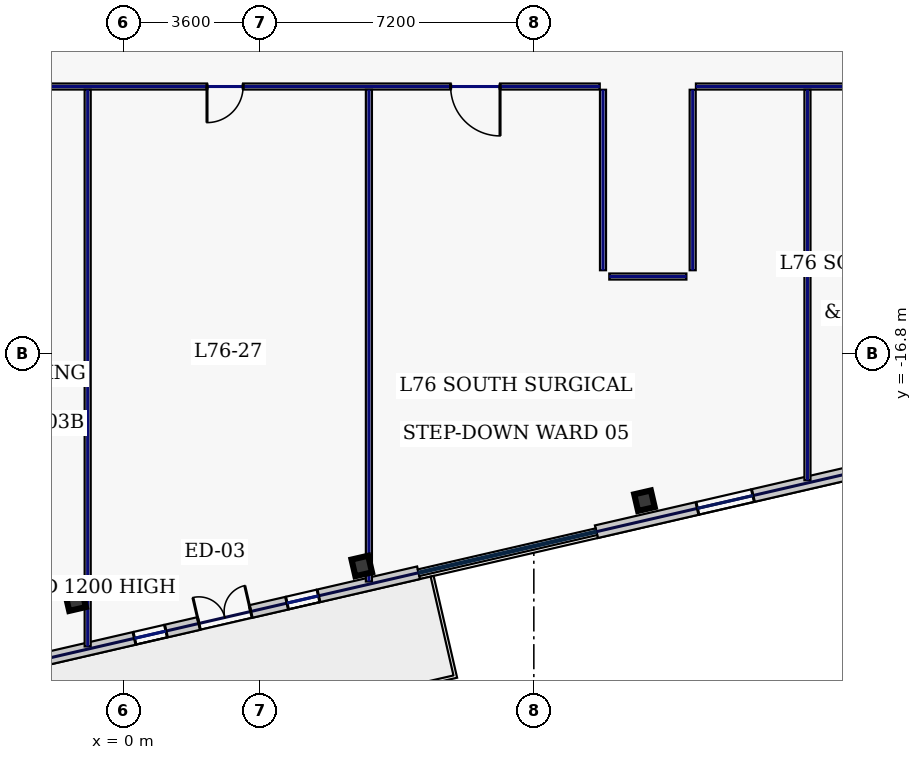
"""IFC4 building model, lengths in metres.
Left out: names, types, materials, properties, quantities, classifications, styles, units other than length and angle.
Written with IfcOpenShell. Run it as: python <this file> out.ifc"""

import sys

from ifc_helpers import new_model, si_unit, direction, frame, frame_2d, origin, origin_2d, place, context, subcontext, project, spatial, rectangle, hollow_rectangle, extrude, element, fill, save


model = new_model("IFC4")
c1 = context("Model", 3, precision=1e-05, world=origin(), true_north=direction((0.0, 1.0)))
c2 = subcontext(c1, "Body", "Model", "MODEL_VIEW")
j1 = project(units=[si_unit("LENGTHUNIT", "METRE"), si_unit("PLANEANGLEUNIT", "RADIAN")], contexts=[c1])
p1 = place(None, origin())
s1 = spatial("IfcSite", under=j1, at=p1, CompositionType="ELEMENT")
p2 = place(p1, origin())
s2 = spatial("IfcBuilding", under=s1, at=p2, CompositionType="ELEMENT")
p3 = place(p2, frame((0.0, 0.0, 325.0)))
s3 = spatial("IfcBuildingStorey", under=s2, at=p3, CompositionType="ELEMENT", Elevation=325.0)
for number, where, z_axis, x_axis in (
    (1, (-1.258, -23.31, 0.0), (0.0, 0.0, 1.0), (0.974, 0.225, 0.0)),
    (2, (6.273, -22.397, 0.0), (0.0, 0.0, 1.0), (0.974, 0.225, 0.0)),
    (3, (13.711, -20.68, 0.0), (0.0, 0.0, 1.0), (0.974, 0.225, 0.0)),
):
    element("IfcColumn", number, at=place(p3, frame(where, z_axis=z_axis, x_axis=x_axis)), inside=s3, PredefinedType="COLUMN", context=c2, shape_type="SweptSolid", body=[
        extrude(hollow_rectangle(XDim=0.45, YDim=0.45, WallThickness=0.022, at=origin_2d()), origin(), (0.0, 0.0, 1.0), 3.74),
    ])
p4 = place(p3, frame((-2.295, -24.898, 0.0), z_axis=(0.0, 0.0, 1.0), x_axis=(0.974370872906, 0.224947553958, 0.0)))
e4 = element("IfcWall", 4, at=p4, inside=s3, PredefinedType="STANDARD", context=c2, shape_type="SweptSolid", body=[
    extrude(rectangle(XDim=10.328, YDim=0.34, at=frame_2d((5.164, 0.0))), origin(), (0.0, 0.0, 1.0), 3.74),
])
p5 = place(p4, frame((4.394, 0.0, 0.0)))
e5 = element("IfcOpeningElement", 5, at=p5, cuts=e4, PredefinedType="OPENING", context=c2, shape_type="SweptSolid", body=[
    extrude(rectangle(XDim=1.4, YDim=2.2, at=frame_2d((0.7, 1.1))), frame((0.0, 0.18, 0.0), z_axis=(0.0, -1.0, 0.0), x_axis=(1.0, 0.0, 0.0)), (0.0, 0.0, 1.0), 0.36),
])
p6 = place(p4, frame((2.655, 0.0, 0.9)))
e6 = element("IfcOpeningElement", 6, at=p6, cuts=e4, PredefinedType="OPENING", context=c2, shape_type="SweptSolid", body=[
    extrude(rectangle(XDim=0.85, YDim=1.85, at=frame_2d((0.425, 0.925))), frame((0.0, 0.18, 0.0), z_axis=(0.0, -1.0, 0.0), x_axis=(1.0, 0.0, 0.0)), (0.0, 0.0, 1.0), 0.36),
])
p7 = place(p4, frame((6.774, 0.0, 0.9)))
e7 = element("IfcOpeningElement", 7, at=p7, cuts=e4, PredefinedType="OPENING", context=c2, shape_type="SweptSolid", body=[
    extrude(rectangle(XDim=0.85, YDim=1.85, at=frame_2d((0.425, 0.925))), frame((0.0, 0.18, 0.0), z_axis=(0.0, -1.0, 0.0), x_axis=(1.0, 0.0, 0.0)), (0.0, 0.0, 1.0), 0.36),
])
p8 = place(p3, frame((12.445, -21.495, 0.0), z_axis=(0.0, 0.0, 1.0), x_axis=(0.974369392164, 0.224953967767, 0.0)))
e8 = element("IfcWall", 8, at=p8, inside=s3, PredefinedType="STANDARD", context=c2, shape_type="SweptSolid", body=[
    extrude(rectangle(XDim=17.366, YDim=0.34, at=frame_2d((8.683, 0.0))), origin(), (0.0, 0.0, 1.0), 3.74),
])
p9 = place(p8, frame((2.729, 0.0, 0.9)))
e9 = element("IfcOpeningElement", 9, at=p9, cuts=e8, PredefinedType="OPENING", context=c2, shape_type="SweptSolid", body=[
    extrude(rectangle(XDim=1.5, YDim=2.0, at=frame_2d((0.75, 1.0))), frame((0.0, 0.18, 0.0), z_axis=(0.0, -1.0, 0.0), x_axis=(1.0, 0.0, 0.0)), (0.0, 0.0, 1.0), 0.36),
])
p10 = place(p8, frame((6.89, 0.0, 0.9)))
e10 = element("IfcOpeningElement", 10, at=p10, cuts=e8, PredefinedType="OPENING", context=c2, shape_type="SweptSolid", body=[
    extrude(rectangle(XDim=0.85, YDim=1.85, at=frame_2d((0.425, 0.925))), frame((0.0, 0.18, 0.0), z_axis=(0.0, -1.0, 0.0), x_axis=(1.0, 0.0, 0.0)), (0.0, 0.0, 1.0), 0.36),
])
p11 = place(p8, frame((10.363, 0.0, 0.9)))
e11 = element("IfcOpeningElement", 11, at=p11, cuts=e8, PredefinedType="OPENING", context=c2, shape_type="SweptSolid", body=[
    extrude(rectangle(XDim=0.85, YDim=1.85, at=frame_2d((0.425, 0.925))), frame((0.0, 0.18, 0.0), z_axis=(0.0, -1.0, 0.0), x_axis=(1.0, 0.0, 0.0)), (0.0, 0.0, 1.0), 0.36),
])
p12 = place(p8, frame((13.875, 0.0, 0.9)))
e12 = element("IfcOpeningElement", 12, at=p12, cuts=e8, PredefinedType="OPENING", context=c2, shape_type="SweptSolid", body=[
    extrude(rectangle(XDim=1.5, YDim=2.0, at=frame_2d((0.75, 1.0))), frame((0.0, 0.18, 0.0), z_axis=(0.0, -1.0, 0.0), x_axis=(1.0, 0.0, 0.0)), (0.0, 0.0, 1.0), 0.36),
])
p13 = place(p3, frame((24.145, -9.78, 0.0), z_axis=(0.0, 0.0, 1.0), x_axis=(-1.0, 0.0, 0.0)))
e13 = element("IfcWall", 13, at=p13, inside=s3, PredefinedType="PARTITIONING", context=c2, shape_type="SweptSolid", body=[
    extrude(rectangle(XDim=9.08, YDim=0.16, at=frame_2d((4.54, 0.0))), origin(), (0.0, 0.0, 1.0), 3.74),
])
p14 = place(p13, frame((2.834, 0.0, 0.0)))
e14 = element("IfcOpeningElement", 14, at=p14, cuts=e13, PredefinedType="OPENING", context=c2, shape_type="SweptSolid", body=[
    extrude(rectangle(XDim=0.95, YDim=2.2, at=frame_2d((0.475, 1.1))), frame((0.0, 0.09, 0.0), z_axis=(0.0, -1.0, 0.0), x_axis=(1.0, 0.0, 0.0)), (0.0, 0.0, 1.0), 0.18),
])
p15 = place(p3, frame((14.98, -9.865, 0.0), z_axis=(0.0, 0.0, 1.0), x_axis=(0.0, -1.0, 0.0)))
e15 = element("IfcWall", 15, at=p15, inside=s3, PredefinedType="PARTITIONING", context=c2, shape_type="SweptSolid", body=[
    extrude(rectangle(XDim=4.75, YDim=0.16, at=frame_2d((2.375, 0.0))), origin(), (0.0, 0.0, 1.0), 3.74),
])
p16 = place(p3, frame((14.815, -14.78, 0.0), z_axis=(0.0, 0.0, 1.0), x_axis=(-1.0, 0.0, 0.0)))
e16 = element("IfcWall", 16, at=p16, inside=s3, PredefinedType="PARTITIONING", context=c2, shape_type="SweptSolid", body=[
    extrude(rectangle(XDim=2.03, YDim=0.16, at=frame_2d((1.015, 0.0))), origin(), (0.0, 0.0, 1.0), 3.74),
])
p17 = place(p3, frame((12.62, -14.615, 0.0), z_axis=(0.0, 0.0, 1.0), x_axis=(0.0, 1.0, 0.0)))
e17 = element("IfcWall", 17, at=p17, inside=s3, PredefinedType="PARTITIONING", context=c2, shape_type="SweptSolid", body=[
    extrude(rectangle(XDim=4.75, YDim=0.16, at=frame_2d((2.375, 0.0))), origin(), (0.0, 0.0, 1.0), 3.74),
])
p18 = place(p3, frame((12.535, -9.78, 0.0), z_axis=(0.0, 0.0, 1.0), x_axis=(-1.0, 0.0, 0.0)))
e18 = element("IfcWall", 18, at=p18, inside=s3, PredefinedType="PARTITIONING", context=c2, shape_type="SweptSolid", body=[
    extrude(rectangle(XDim=36.68, YDim=0.16, at=frame_2d((18.34, 0.0))), origin(), (0.0, 0.0, 1.0), 3.74),
])
p19 = place(p18, frame((33.856, 0.0, 0.0)))
e19 = element("IfcOpeningElement", 19, at=p19, cuts=e18, PredefinedType="OPENING", context=c2, shape_type="SweptSolid", body=[
    extrude(rectangle(XDim=1.15, YDim=2.2, at=frame_2d((0.575, 1.1))), frame((0.0, 0.09, 0.0), z_axis=(0.0, -1.0, 0.0), x_axis=(1.0, 0.0, 0.0)), (0.0, 0.0, 1.0), 0.18),
])
p20 = place(p18, frame((29.535, 0.0, 0.0)))
e20 = element("IfcOpeningElement", 20, at=p20, cuts=e18, PredefinedType="OPENING", context=c2, shape_type="SweptSolid", body=[
    extrude(rectangle(XDim=0.95, YDim=2.2, at=frame_2d((0.475, 1.1))), frame((0.0, 0.09, 0.0), z_axis=(0.0, -1.0, 0.0), x_axis=(1.0, 0.0, 0.0)), (0.0, 0.0, 1.0), 0.18),
])
p21 = place(p18, frame((23.555, 0.0, 0.0)))
e21 = element("IfcOpeningElement", 21, at=p21, cuts=e18, PredefinedType="OPENING", context=c2, shape_type="SweptSolid", body=[
    extrude(rectangle(XDim=1.05, YDim=2.2, at=frame_2d((0.525, 1.1))), frame((0.0, 0.09, 0.0), z_axis=(0.0, -1.0, 0.0), x_axis=(1.0, 0.0, 0.0)), (0.0, 0.0, 1.0), 0.18),
])
p22 = place(p18, frame((16.425, 0.0, 0.0)))
e22 = element("IfcOpeningElement", 22, at=p22, cuts=e18, PredefinedType="OPENING", context=c2, shape_type="SweptSolid", body=[
    extrude(rectangle(XDim=0.95, YDim=2.2, at=frame_2d((0.475, 1.1))), frame((0.0, 0.09, 0.0), z_axis=(0.0, -1.0, 0.0), x_axis=(1.0, 0.0, 0.0)), (0.0, 0.0, 1.0), 0.18),
])
p23 = place(p18, frame((9.385, 0.0, 0.0)))
e23 = element("IfcOpeningElement", 23, at=p23, cuts=e18, PredefinedType="OPENING", context=c2, shape_type="SweptSolid", body=[
    extrude(rectangle(XDim=0.95, YDim=2.2, at=frame_2d((0.475, 1.1))), frame((0.0, 0.09, 0.0), z_axis=(0.0, -1.0, 0.0), x_axis=(1.0, 0.0, 0.0)), (0.0, 0.0, 1.0), 0.18),
])
p24 = place(p18, frame((2.624, 0.0, 0.0)))
e24 = element("IfcOpeningElement", 24, at=p24, cuts=e18, PredefinedType="OPENING", context=c2, shape_type="SweptSolid", body=[
    extrude(rectangle(XDim=1.3, YDim=2.2, at=frame_2d((0.65, 1.1))), frame((0.0, 0.09, 0.0), z_axis=(0.0, -1.0, 0.0), x_axis=(1.0, 0.0, 0.0)), (0.0, 0.0, 1.0), 0.18),
])
p25 = place(p3, frame((-0.94, -24.514, 0.0), z_axis=(0.0, 0.0, 1.0), x_axis=(0.0, 1.0, 0.0)))
e25 = element("IfcWall", 25, at=p25, inside=s3, PredefinedType="PARTITIONING", context=c2, shape_type="SweptSolid", body=[
    extrude(rectangle(XDim=14.649, YDim=0.16, at=frame_2d((7.324, 0.0))), origin(), (0.0, 0.0, 1.0), 3.74),
])
p26 = place(p3, frame((6.46, -22.805, 0.0), z_axis=(0.0, 0.0, 1.0), x_axis=(0.0, 1.0, 0.0)))
e26 = element("IfcWall", 26, at=p26, inside=s3, PredefinedType="PARTITIONING", context=c2, shape_type="SweptSolid", body=[
    extrude(rectangle(XDim=12.94, YDim=0.16, at=frame_2d((6.47, 0.0))), origin(), (0.0, 0.0, 1.0), 3.74),
])
p27 = place(p3, frame((18.0, -20.141, 0.0), z_axis=(0.0, 0.0, 1.0), x_axis=(0.0, 1.0, 0.0)))
e27 = element("IfcWall", 27, at=p27, inside=s3, PredefinedType="PARTITIONING", context=c2, shape_type="SweptSolid", body=[
    extrude(rectangle(XDim=10.276, YDim=0.16, at=frame_2d((5.138, 0.0))), origin(), (0.0, 0.0, 1.0), 3.74),
])
p28 = place(p5, origin())
e28 = element("IfcDoor", 28, at=p28, inside=s3, OperationType="DOUBLE_SWING_LEFT", PredefinedType="DOOR", context=c2, shape_type="SweptSolid", body=[
    extrude(rectangle(XDim=1.4, YDim=2.2, at=frame_2d((0.7, 1.1))), frame((0.0, 0.025, 0.0), z_axis=(0.0, -1.0, 0.0), x_axis=(1.0, 0.0, 0.0)), (0.0, 0.0, 1.0), 0.05),
])
fill(e5, e28)
p29 = place(p6, origin())
e29 = element("IfcWindow", 29, at=p29, inside=s3, PartitioningType="SINGLE_PANEL", PredefinedType="WINDOW", context=c2, shape_type="SweptSolid", body=[
    extrude(rectangle(XDim=0.85, YDim=1.85, at=frame_2d((0.425, 0.925))), frame((0.0, 0.03, 0.0), z_axis=(0.0, -1.0, 0.0), x_axis=(1.0, 0.0, 0.0)), (0.0, 0.0, 1.0), 0.06),
])
fill(e6, e29)
p30 = place(p7, origin())
e30 = element("IfcWindow", 30, at=p30, inside=s3, PartitioningType="SINGLE_PANEL", PredefinedType="WINDOW", context=c2, shape_type="SweptSolid", body=[
    extrude(rectangle(XDim=0.85, YDim=1.85, at=frame_2d((0.425, 0.925))), frame((0.0, 0.03, 0.0), z_axis=(0.0, -1.0, 0.0), x_axis=(1.0, 0.0, 0.0)), (0.0, 0.0, 1.0), 0.06),
])
fill(e7, e30)
p31 = place(p9, origin())
e31 = element("IfcWindow", 31, at=p31, inside=s3, PartitioningType="SINGLE_PANEL", PredefinedType="WINDOW", context=c2, shape_type="SweptSolid", body=[
    extrude(rectangle(XDim=1.5, YDim=2.0, at=frame_2d((0.75, 1.0))), frame((0.0, 0.03, 0.0), z_axis=(0.0, -1.0, 0.0), x_axis=(1.0, 0.0, 0.0)), (0.0, 0.0, 1.0), 0.06),
])
fill(e9, e31)
p32 = place(p23, origin())
e32 = element("IfcDoor", 32, at=p32, inside=s3, OperationType="SINGLE_SWING_RIGHT", PredefinedType="DOOR", context=c2, shape_type="SweptSolid", body=[
    extrude(rectangle(XDim=0.95, YDim=2.2, at=frame_2d((0.475, 1.1))), frame((0.0, 0.025, 0.0), z_axis=(0.0, -1.0, 0.0), x_axis=(1.0, 0.0, 0.0)), (0.0, 0.0, 1.0), 0.05),
])
fill(e23, e32)
p33 = place(p24, origin())
e33 = element("IfcDoor", 33, at=p33, inside=s3, OperationType="SINGLE_SWING_LEFT", PredefinedType="DOOR", context=c2, shape_type="SweptSolid", body=[
    extrude(rectangle(XDim=1.3, YDim=2.2, at=frame_2d((0.65, 1.1))), frame((0.0, 0.025, 0.0), z_axis=(0.0, -1.0, 0.0), x_axis=(1.0, 0.0, 0.0)), (0.0, 0.0, 1.0), 0.05),
])
fill(e24, e33)
save(model, sys.argv[1])
